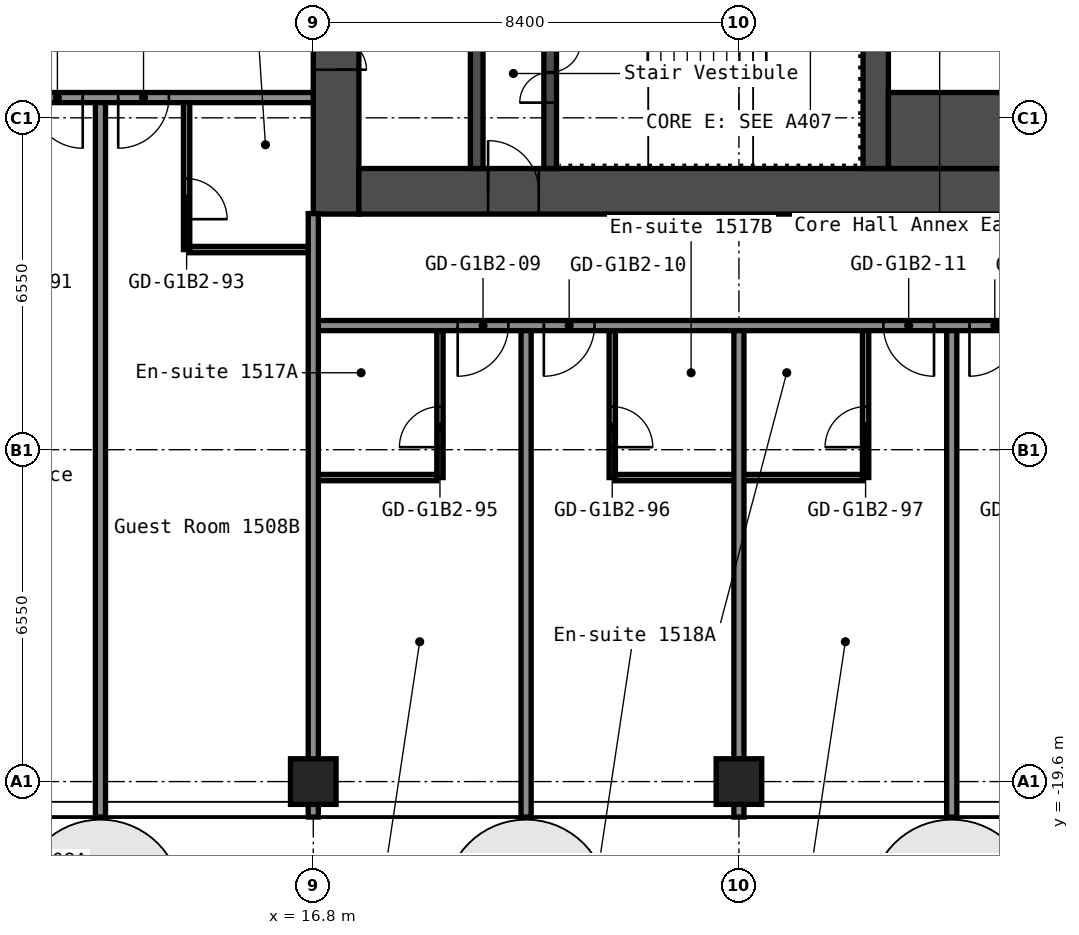
"""IFC4 building model, lengths in metres.
Left out: names, types, materials, properties, quantities, classifications, styles, units other than length and angle.
Written with IfcOpenShell. Run it as: python <this file> out.ifc"""

import sys

from ifc_helpers import new_model, si_unit, direction, frame, frame_2d, origin, origin_2d, place, context, subcontext, project, spatial, rectangle, hollow_rectangle, extrude, element, fill, save


model = new_model("IFC4")
c1 = context("Model", 3, precision=1e-05, world=origin(), true_north=direction((0.0, 1.0)))
c2 = subcontext(c1, "Body", "Model", "MODEL_VIEW")
j1 = project(units=[si_unit("LENGTHUNIT", "METRE"), si_unit("PLANEANGLEUNIT", "RADIAN")], contexts=[c1])
p1 = place(None, origin())
s1 = spatial("IfcSite", under=j1, at=p1, CompositionType="ELEMENT")
p2 = place(p1, origin())
s2 = spatial("IfcBuilding", under=s1, at=p2, CompositionType="ELEMENT")
p3 = place(p2, frame((0.0, 0.0, 55.0)))
s3 = spatial("IfcBuildingStorey", under=s2, at=p3, CompositionType="ELEMENT", Elevation=55.0)
for number, where, z_axis, x_axis in (
    (1, (16.8, -19.6, 0.0), (0.0, 0.0, 1.0), (1.0, 0.0, 0.0)),
    (2, (25.2, -19.6, 0.0), (0.0, 0.0, 1.0), (1.0, 0.0, 0.0)),
):
    element("IfcColumn", number, at=place(p3, frame(where, z_axis=z_axis, x_axis=x_axis)), inside=s3, PredefinedType="COLUMN", context=c2, shape_type="SweptSolid", body=[
        extrude(hollow_rectangle(XDim=0.9, YDim=0.9, WallThickness=0.036, at=origin_2d()), origin(), (0.0, 0.0, 1.0), 2.8),
    ])
p4 = place(p3, frame((17.25, -8.4, 0.0), z_axis=(0.0, 0.0, 1.0), x_axis=(0.0, 1.0, 0.0)))
e3 = element("IfcWall", 3, at=p4, inside=s3, PredefinedType="SHEAR", context=c2, shape_type="SweptSolid", body=[
    extrude(rectangle(XDim=16.8, YDim=0.9, at=frame_2d((8.4, 0.0))), origin(), (0.0, 0.0, 1.0), 2.8),
])
p5 = place(p4, frame((12.75, 0.0, 0.0)))
e4 = element("IfcOpeningElement", 4, at=p5, cuts=e3, PredefinedType="OPENING", context=c2, shape_type="SweptSolid", body=[
    extrude(rectangle(XDim=1.2, YDim=2.1, at=frame_2d((0.6, 1.05))), frame((0.0, 0.46, 0.0), z_axis=(0.0, -1.0, 0.0), x_axis=(1.0, 0.0, 0.0)), (0.0, 0.0, 1.0), 0.92),
])
p6 = place(p4, frame((2.85, 0.0, 0.0)))
e5 = element("IfcOpeningElement", 5, at=p6, cuts=e3, PredefinedType="OPENING", context=c2, shape_type="SweptSolid", body=[
    extrude(rectangle(XDim=1.2, YDim=2.1, at=frame_2d((0.6, 1.05))), frame((0.0, 0.46, 0.0), z_axis=(0.0, -1.0, 0.0), x_axis=(1.0, 0.0, 0.0)), (0.0, 0.0, 1.0), 0.92),
])
p7 = place(p3, frame((17.7, -7.95, 0.0), z_axis=(0.0, 0.0, 1.0), x_axis=(1.0, 0.0, 0.0)))
e6 = element("IfcWall", 6, at=p7, inside=s3, PredefinedType="SHEAR", context=c2, shape_type="SweptSolid", body=[
    extrude(rectangle(XDim=15.0, YDim=0.9, at=frame_2d((7.5, 0.0))), origin(), (0.0, 0.0, 1.0), 2.8),
])
p8 = place(p7, frame((2.55, 0.0, 0.0)))
e7 = element("IfcOpeningElement", 7, at=p8, cuts=e6, PredefinedType="OPENING", context=c2, shape_type="SweptSolid", body=[
    extrude(rectangle(XDim=1.0, YDim=2.1, at=frame_2d((0.5, 1.05))), frame((0.0, 0.46, 0.0), z_axis=(0.0, -1.0, 0.0), x_axis=(1.0, 0.0, 0.0)), (0.0, 0.0, 1.0), 0.92),
])
p9 = place(p3, frame((20.025, -7.5, 0.0), z_axis=(0.0, 0.0, 1.0), x_axis=(0.0, 1.0, 0.0)))
e8 = element("IfcWall", 8, at=p9, inside=s3, PredefinedType="SHEAR", context=c2, shape_type="SweptSolid", body=[
    extrude(rectangle(XDim=6.3, YDim=0.25, at=frame_2d((3.15, 0.0))), origin(), (0.0, 0.0, 1.0), 2.8),
])
p10 = place(p9, frame((2.4, 0.0, 0.0)))
e9 = element("IfcOpeningElement", 9, at=p10, cuts=e8, PredefinedType="OPENING", context=c2, shape_type="SweptSolid", body=[
    extrude(rectangle(XDim=1.0, YDim=2.1, at=frame_2d((0.5, 1.05))), frame((0.0, 0.135, 0.0), z_axis=(0.0, -1.0, 0.0), x_axis=(1.0, 0.0, 0.0)), (0.0, 0.0, 1.0), 0.27),
])
p11 = place(p3, frame((21.475, -7.5, 0.0), z_axis=(0.0, 0.0, 1.0), x_axis=(0.0, 1.0, 0.0)))
e10 = element("IfcWall", 10, at=p11, inside=s3, PredefinedType="SHEAR", context=c2, shape_type="SweptSolid", body=[
    extrude(rectangle(XDim=3.75, YDim=0.25, at=frame_2d((1.875, 0.0))), origin(), (0.0, 0.0, 1.0), 2.8),
])
p12 = place(p11, frame((1.3, 0.0, 0.0)))
e11 = element("IfcOpeningElement", 11, at=p12, cuts=e10, PredefinedType="OPENING", context=c2, shape_type="SweptSolid", body=[
    extrude(rectangle(XDim=1.2, YDim=2.1, at=frame_2d((0.6, 1.05))), frame((0.0, 0.135, 0.0), z_axis=(0.0, -1.0, 0.0), x_axis=(1.0, 0.0, 0.0)), (0.0, 0.0, 1.0), 0.27),
])
p13 = place(p3, frame((27.9, -7.5, 0.0), z_axis=(0.0, 0.0, 1.0), x_axis=(0.0, 1.0, 0.0)))
e12 = element("IfcWall", 12, at=p13, inside=s3, PredefinedType="SHEAR", context=c2, shape_type="SweptSolid", body=[
    extrude(rectangle(XDim=3.75, YDim=0.5, at=frame_2d((1.875, 0.0))), origin(), (0.0, 0.0, 1.0), 2.8),
])
p14 = place(p3, frame((28.15, -6.75, 0.0), z_axis=(0.0, 0.0, 1.0), x_axis=(1.0, 0.0, 0.0)))
e13 = element("IfcWall", 13, at=p14, inside=s3, PredefinedType="SHEAR", context=c2, shape_type="SweptSolid", body=[
    extrude(rectangle(XDim=4.55, YDim=1.5, at=frame_2d((2.275, 0.0))), origin(), (0.0, 0.0, 1.0), 2.8),
])
p15 = place(p3, frame((16.9, -13.6, 0.0), z_axis=(0.0, 0.0, 1.0), x_axis=(1.0, 0.0, 0.0)))
e14 = element("IfcWall", 14, at=p15, inside=s3, PredefinedType="PARTITIONING", context=c2, shape_type="SweptSolid", body=[
    extrude(rectangle(XDim=2.338, YDim=0.125, at=frame_2d((1.169, 0.0))), origin(), (0.0, 0.0, 1.0), 2.8),
])
p16 = place(p3, frame((22.762, -13.6, 0.0), z_axis=(0.0, 0.0, 1.0), x_axis=(1.0, 0.0, 0.0)))
e15 = element("IfcWall", 15, at=p16, inside=s3, PredefinedType="PARTITIONING", context=c2, shape_type="SweptSolid", body=[
    extrude(rectangle(XDim=4.875, YDim=0.125, at=frame_2d((2.438, 0.0))), origin(), (0.0, 0.0, 1.0), 2.8),
])
p17 = place(p3, frame((16.8, -10.6, 0.0), z_axis=(0.0, 0.0, 1.0), x_axis=(1.0, 0.0, 0.0)))
e16 = element("IfcWall", 16, at=p17, inside=s3, PredefinedType="PARTITIONING", context=c2, shape_type="SweptSolid", body=[
    extrude(rectangle(XDim=34.3, YDim=0.2, at=frame_2d((17.15, 0.0))), origin(), (0.0, 0.0, 1.0), 2.8),
])
p18 = place(p17, frame((2.85, 0.0, 0.0)))
e17 = element("IfcOpeningElement", 17, at=p18, cuts=e16, PredefinedType="OPENING", context=c2, shape_type="SweptSolid", body=[
    extrude(rectangle(XDim=1.0, YDim=2.1, at=frame_2d((0.5, 1.05))), frame((0.0, 0.11, 0.0), z_axis=(0.0, -1.0, 0.0), x_axis=(1.0, 0.0, 0.0)), (0.0, 0.0, 1.0), 0.22),
])
p19 = place(p17, frame((4.55, 0.0, 0.0)))
e18 = element("IfcOpeningElement", 18, at=p19, cuts=e16, PredefinedType="OPENING", context=c2, shape_type="SweptSolid", body=[
    extrude(rectangle(XDim=1.0, YDim=2.1, at=frame_2d((0.5, 1.05))), frame((0.0, 0.11, 0.0), z_axis=(0.0, -1.0, 0.0), x_axis=(1.0, 0.0, 0.0)), (0.0, 0.0, 1.0), 0.22),
])
p20 = place(p17, frame((11.25, 0.0, 0.0)))
e19 = element("IfcOpeningElement", 19, at=p20, cuts=e16, PredefinedType="OPENING", context=c2, shape_type="SweptSolid", body=[
    extrude(rectangle(XDim=1.0, YDim=2.1, at=frame_2d((0.5, 1.05))), frame((0.0, 0.11, 0.0), z_axis=(0.0, -1.0, 0.0), x_axis=(1.0, 0.0, 0.0)), (0.0, 0.0, 1.0), 0.22),
])
p21 = place(p17, frame((12.95, 0.0, 0.0)))
e20 = element("IfcOpeningElement", 20, at=p21, cuts=e16, PredefinedType="OPENING", context=c2, shape_type="SweptSolid", body=[
    extrude(rectangle(XDim=1.0, YDim=2.1, at=frame_2d((0.5, 1.05))), frame((0.0, 0.11, 0.0), z_axis=(0.0, -1.0, 0.0), x_axis=(1.0, 0.0, 0.0)), (0.0, 0.0, 1.0), 0.22),
])
p22 = place(p17, frame((19.65, 0.0, 0.0)))
e21 = element("IfcOpeningElement", 21, at=p22, cuts=e16, PredefinedType="OPENING", context=c2, shape_type="SweptSolid", body=[
    extrude(rectangle(XDim=1.0, YDim=2.1, at=frame_2d((0.5, 1.05))), frame((0.0, 0.11, 0.0), z_axis=(0.0, -1.0, 0.0), x_axis=(1.0, 0.0, 0.0)), (0.0, 0.0, 1.0), 0.22),
])
p23 = place(p17, frame((21.35, 0.0, 0.0)))
e22 = element("IfcOpeningElement", 22, at=p23, cuts=e16, PredefinedType="OPENING", context=c2, shape_type="SweptSolid", body=[
    extrude(rectangle(XDim=1.0, YDim=2.1, at=frame_2d((0.5, 1.05))), frame((0.0, 0.11, 0.0), z_axis=(0.0, -1.0, 0.0), x_axis=(1.0, 0.0, 0.0)), (0.0, 0.0, 1.0), 0.22),
])
p24 = place(p17, frame((28.15, 0.0, 0.0)))
e23 = element("IfcOpeningElement", 23, at=p24, cuts=e16, PredefinedType="OPENING", context=c2, shape_type="SweptSolid", body=[
    extrude(rectangle(XDim=1.0, YDim=2.1, at=frame_2d((0.5, 1.05))), frame((0.0, 0.11, 0.0), z_axis=(0.0, -1.0, 0.0), x_axis=(1.0, 0.0, 0.0)), (0.0, 0.0, 1.0), 0.22),
])
p25 = place(p17, frame((30.05, 0.0, 0.0)))
e24 = element("IfcOpeningElement", 24, at=p25, cuts=e16, PredefinedType="OPENING", context=c2, shape_type="SweptSolid", body=[
    extrude(rectangle(XDim=1.0, YDim=2.1, at=frame_2d((0.5, 1.05))), frame((0.0, 0.11, 0.0), z_axis=(0.0, -1.0, 0.0), x_axis=(1.0, 0.0, 0.0)), (0.0, 0.0, 1.0), 0.22),
])
p26 = place(p3, frame((14.363, -9.1, 0.0), z_axis=(0.0, 0.0, 1.0), x_axis=(1.0, 0.0, 0.0)))
e25 = element("IfcWall", 25, at=p26, inside=s3, PredefinedType="PARTITIONING", context=c2, shape_type="SweptSolid", body=[
    extrude(rectangle(XDim=2.337, YDim=0.125, at=frame_2d((1.169, 0.0))), origin(), (0.0, 0.0, 1.0), 2.8),
])
p27 = place(p3, frame((-16.8, -6.1, 0.0), z_axis=(0.0, 0.0, 1.0), x_axis=(1.0, 0.0, 0.0)))
e26 = element("IfcWall", 26, at=p27, inside=s3, PredefinedType="PARTITIONING", context=c2, shape_type="SweptSolid", body=[
    extrude(rectangle(XDim=33.6, YDim=0.2, at=frame_2d((16.8, 0.0))), origin(), (0.0, 0.0, 1.0), 2.8),
])
p28 = place(p27, frame((2.85, 0.0, 0.0)))
e27 = element("IfcOpeningElement", 27, at=p28, cuts=e26, PredefinedType="OPENING", context=c2, shape_type="SweptSolid", body=[
    extrude(rectangle(XDim=1.0, YDim=2.1, at=frame_2d((0.5, 1.05))), frame((0.0, 0.11, 0.0), z_axis=(0.0, -1.0, 0.0), x_axis=(1.0, 0.0, 0.0)), (0.0, 0.0, 1.0), 0.22),
])
p29 = place(p27, frame((4.55, 0.0, 0.0)))
e28 = element("IfcOpeningElement", 28, at=p29, cuts=e26, PredefinedType="OPENING", context=c2, shape_type="SweptSolid", body=[
    extrude(rectangle(XDim=1.0, YDim=2.1, at=frame_2d((0.5, 1.05))), frame((0.0, 0.11, 0.0), z_axis=(0.0, -1.0, 0.0), x_axis=(1.0, 0.0, 0.0)), (0.0, 0.0, 1.0), 0.22),
])
p30 = place(p27, frame((11.25, 0.0, 0.0)))
e29 = element("IfcOpeningElement", 29, at=p30, cuts=e26, PredefinedType="OPENING", context=c2, shape_type="SweptSolid", body=[
    extrude(rectangle(XDim=1.0, YDim=2.1, at=frame_2d((0.5, 1.05))), frame((0.0, 0.11, 0.0), z_axis=(0.0, -1.0, 0.0), x_axis=(1.0, 0.0, 0.0)), (0.0, 0.0, 1.0), 0.22),
])
p31 = place(p27, frame((12.95, 0.0, 0.0)))
e30 = element("IfcOpeningElement", 30, at=p31, cuts=e26, PredefinedType="OPENING", context=c2, shape_type="SweptSolid", body=[
    extrude(rectangle(XDim=1.0, YDim=2.1, at=frame_2d((0.5, 1.05))), frame((0.0, 0.11, 0.0), z_axis=(0.0, -1.0, 0.0), x_axis=(1.0, 0.0, 0.0)), (0.0, 0.0, 1.0), 0.22),
])
p32 = place(p27, frame((18.7, 0.0, 0.0)))
e31 = element("IfcOpeningElement", 31, at=p32, cuts=e26, PredefinedType="OPENING", context=c2, shape_type="SweptSolid", body=[
    extrude(rectangle(XDim=0.9, YDim=2.1, at=frame_2d((0.45, 1.05))), frame((0.0, 0.11, 0.0), z_axis=(0.0, -1.0, 0.0), x_axis=(1.0, 0.0, 0.0)), (0.0, 0.0, 1.0), 0.22),
])
p33 = place(p27, frame((22.9, 0.0, 0.0)))
e32 = element("IfcOpeningElement", 32, at=p33, cuts=e26, PredefinedType="OPENING", context=c2, shape_type="SweptSolid", body=[
    extrude(rectangle(XDim=0.9, YDim=2.1, at=frame_2d((0.45, 1.05))), frame((0.0, 0.11, 0.0), z_axis=(0.0, -1.0, 0.0), x_axis=(1.0, 0.0, 0.0)), (0.0, 0.0, 1.0), 0.22),
])
p34 = place(p27, frame((28.05, 0.0, 0.0)))
e33 = element("IfcOpeningElement", 33, at=p34, cuts=e26, PredefinedType="OPENING", context=c2, shape_type="SweptSolid", body=[
    extrude(rectangle(XDim=1.0, YDim=2.1, at=frame_2d((0.5, 1.05))), frame((0.0, 0.11, 0.0), z_axis=(0.0, -1.0, 0.0), x_axis=(1.0, 0.0, 0.0)), (0.0, 0.0, 1.0), 0.22),
])
p35 = place(p27, frame((29.75, 0.0, 0.0)))
e34 = element("IfcOpeningElement", 34, at=p35, cuts=e26, PredefinedType="OPENING", context=c2, shape_type="SweptSolid", body=[
    extrude(rectangle(XDim=1.0, YDim=2.1, at=frame_2d((0.5, 1.05))), frame((0.0, 0.11, 0.0), z_axis=(0.0, -1.0, 0.0), x_axis=(1.0, 0.0, 0.0)), (0.0, 0.0, 1.0), 0.22),
])
p36 = place(p3, frame((12.6, -20.3, 0.0), z_axis=(0.0, 0.0, 1.0), x_axis=(0.0, 1.0, 0.0)))
e35 = element("IfcWall", 35, at=p36, inside=s3, PredefinedType="PARTITIONING", context=c2, shape_type="SweptSolid", body=[
    extrude(rectangle(XDim=14.1, YDim=0.2, at=frame_2d((7.05, 0.0))), origin(), (0.0, 0.0, 1.0), 2.8),
])
p37 = place(p3, frame((14.3, -9.1, 0.0), z_axis=(0.0, 0.0, 1.0), x_axis=(0.0, 1.0, 0.0)))
e36 = element("IfcWall", 36, at=p37, inside=s3, PredefinedType="PARTITIONING", context=c2, shape_type="SweptSolid", body=[
    extrude(rectangle(XDim=2.9, YDim=0.125, at=frame_2d((1.45, 0.0))), origin(), (0.0, 0.0, 1.0), 2.8),
])
p38 = place(p37, frame((0.6, 0.0, 0.0)))
e37 = element("IfcOpeningElement", 37, at=p38, cuts=e36, PredefinedType="OPENING", context=c2, shape_type="SweptSolid", body=[
    extrude(rectangle(XDim=0.8, YDim=2.1, at=frame_2d((0.4, 1.05))), frame((0.0, 0.073, 0.0), z_axis=(0.0, -1.0, 0.0), x_axis=(1.0, 0.0, 0.0)), (0.0, 0.0, 1.0), 0.145),
])
p39 = place(p3, frame((16.8, -20.3, 0.0), z_axis=(0.0, 0.0, 1.0), x_axis=(0.0, 1.0, 0.0)))
e38 = element("IfcWall", 38, at=p39, inside=s3, PredefinedType="PARTITIONING", context=c2, shape_type="SweptSolid", body=[
    extrude(rectangle(XDim=11.91, YDim=0.2, at=frame_2d((5.955, 0.0))), origin(), (0.0, 0.0, 1.0), 2.8),
])
p40 = place(p3, frame((19.3, -13.6, 0.0), z_axis=(0.0, 0.0, 1.0), x_axis=(0.0, 1.0, 0.0)))
e39 = element("IfcWall", 39, at=p40, inside=s3, PredefinedType="PARTITIONING", context=c2, shape_type="SweptSolid", body=[
    extrude(rectangle(XDim=2.9, YDim=0.125, at=frame_2d((1.45, 0.0))), origin(), (0.0, 0.0, 1.0), 2.8),
])
p41 = place(p40, frame((0.6, 0.0, 0.0)))
e40 = element("IfcOpeningElement", 40, at=p41, cuts=e39, PredefinedType="OPENING", context=c2, shape_type="SweptSolid", body=[
    extrude(rectangle(XDim=0.8, YDim=2.1, at=frame_2d((0.4, 1.05))), frame((0.0, 0.073, 0.0), z_axis=(0.0, -1.0, 0.0), x_axis=(1.0, 0.0, 0.0)), (0.0, 0.0, 1.0), 0.145),
])
p42 = place(p3, frame((21.0, -20.3, 0.0), z_axis=(0.0, 0.0, 1.0), x_axis=(0.0, 1.0, 0.0)))
e41 = element("IfcWall", 41, at=p42, inside=s3, PredefinedType="PARTITIONING", context=c2, shape_type="SweptSolid", body=[
    extrude(rectangle(XDim=9.6, YDim=0.2, at=frame_2d((4.8, 0.0))), origin(), (0.0, 0.0, 1.0), 2.8),
])
p43 = place(p3, frame((22.7, -13.6, 0.0), z_axis=(0.0, 0.0, 1.0), x_axis=(0.0, 1.0, 0.0)))
e42 = element("IfcWall", 42, at=p43, inside=s3, PredefinedType="PARTITIONING", context=c2, shape_type="SweptSolid", body=[
    extrude(rectangle(XDim=2.9, YDim=0.125, at=frame_2d((1.45, 0.0))), origin(), (0.0, 0.0, 1.0), 2.8),
])
p44 = place(p43, frame((0.6, 0.0, 0.0)))
e43 = element("IfcOpeningElement", 43, at=p44, cuts=e42, PredefinedType="OPENING", context=c2, shape_type="SweptSolid", body=[
    extrude(rectangle(XDim=0.8, YDim=2.1, at=frame_2d((0.4, 1.05))), frame((0.0, 0.073, 0.0), z_axis=(0.0, -1.0, 0.0), x_axis=(1.0, 0.0, 0.0)), (0.0, 0.0, 1.0), 0.145),
])
p45 = place(p3, frame((25.2, -20.3, 0.0), z_axis=(0.0, 0.0, 1.0), x_axis=(0.0, 1.0, 0.0)))
e44 = element("IfcWall", 44, at=p45, inside=s3, PredefinedType="PARTITIONING", context=c2, shape_type="SweptSolid", body=[
    extrude(rectangle(XDim=9.6, YDim=0.2, at=frame_2d((4.8, 0.0))), origin(), (0.0, 0.0, 1.0), 2.8),
])
p46 = place(p3, frame((27.7, -13.6, 0.0), z_axis=(0.0, 0.0, 1.0), x_axis=(0.0, 1.0, 0.0)))
e45 = element("IfcWall", 45, at=p46, inside=s3, PredefinedType="PARTITIONING", context=c2, shape_type="SweptSolid", body=[
    extrude(rectangle(XDim=2.9, YDim=0.125, at=frame_2d((1.45, 0.0))), origin(), (0.0, 0.0, 1.0), 2.8),
])
p47 = place(p46, frame((0.6, 0.0, 0.0)))
e46 = element("IfcOpeningElement", 46, at=p47, cuts=e45, PredefinedType="OPENING", context=c2, shape_type="SweptSolid", body=[
    extrude(rectangle(XDim=0.8, YDim=2.1, at=frame_2d((0.4, 1.05))), frame((0.0, 0.073, 0.0), z_axis=(0.0, -1.0, 0.0), x_axis=(1.0, 0.0, 0.0)), (0.0, 0.0, 1.0), 0.145),
])
p48 = place(p3, frame((29.4, -20.3, 0.0), z_axis=(0.0, 0.0, 1.0), x_axis=(0.0, 1.0, 0.0)))
e47 = element("IfcWall", 47, at=p48, inside=s3, PredefinedType="PARTITIONING", context=c2, shape_type="SweptSolid", body=[
    extrude(rectangle(XDim=9.6, YDim=0.2, at=frame_2d((4.8, 0.0))), origin(), (0.0, 0.0, 1.0), 2.8),
])
p49 = place(p6, origin())
e48 = element("IfcDoor", 48, at=p49, inside=s3, OperationType="DOUBLE_DOOR_SINGLE_SWING", PredefinedType="DOOR", context=c2, shape_type="SweptSolid", body=[
    extrude(rectangle(XDim=1.2, YDim=2.1, at=frame_2d((0.6, 1.05))), frame((0.0, 0.025, 0.0), z_axis=(0.0, -1.0, 0.0), x_axis=(1.0, 0.0, 0.0)), (0.0, 0.0, 1.0), 0.05),
])
fill(e5, e48)
p50 = place(p8, origin())
e49 = element("IfcDoor", 49, at=p50, inside=s3, OperationType="SINGLE_SWING_RIGHT", PredefinedType="DOOR", context=c2, shape_type="SweptSolid", body=[
    extrude(rectangle(XDim=1.0, YDim=2.1, at=frame_2d((0.5, 1.05))), frame((0.0, 0.025, 0.0), z_axis=(0.0, -1.0, 0.0), x_axis=(1.0, 0.0, 0.0)), (0.0, 0.0, 1.0), 0.05),
])
fill(e7, e49)
p51 = place(p12, origin())
e50 = element("IfcDoor", 50, at=p51, inside=s3, OperationType="DOUBLE_DOOR_SINGLE_SWING", PredefinedType="DOOR", context=c2, shape_type="SweptSolid", body=[
    extrude(rectangle(XDim=1.2, YDim=2.1, at=frame_2d((0.6, 1.05))), frame((0.0, 0.025, 0.0), z_axis=(0.0, -1.0, 0.0), x_axis=(1.0, 0.0, 0.0)), (0.0, 0.0, 1.0), 0.05),
])
fill(e11, e50)
p52 = place(p18, origin())
e51 = element("IfcDoor", 51, at=p52, inside=s3, OperationType="SINGLE_SWING_LEFT", PredefinedType="DOOR", context=c2, shape_type="SweptSolid", body=[
    extrude(rectangle(XDim=1.0, YDim=2.1, at=frame_2d((0.5, 1.05))), frame((0.0, 0.025, 0.0), z_axis=(0.0, -1.0, 0.0), x_axis=(1.0, 0.0, 0.0)), (0.0, 0.0, 1.0), 0.05),
])
fill(e17, e51)
p53 = place(p19, origin())
e52 = element("IfcDoor", 52, at=p53, inside=s3, OperationType="SINGLE_SWING_LEFT", PredefinedType="DOOR", context=c2, shape_type="SweptSolid", body=[
    extrude(rectangle(XDim=1.0, YDim=2.1, at=frame_2d((0.5, 1.05))), frame((0.0, 0.025, 0.0), z_axis=(0.0, -1.0, 0.0), x_axis=(1.0, 0.0, 0.0)), (0.0, 0.0, 1.0), 0.05),
])
fill(e18, e52)
p54 = place(p20, origin())
e53 = element("IfcDoor", 53, at=p54, inside=s3, OperationType="SINGLE_SWING_RIGHT", PredefinedType="DOOR", context=c2, shape_type="SweptSolid", body=[
    extrude(rectangle(XDim=1.0, YDim=2.1, at=frame_2d((0.5, 1.05))), frame((0.0, 0.025, 0.0), z_axis=(0.0, -1.0, 0.0), x_axis=(1.0, 0.0, 0.0)), (0.0, 0.0, 1.0), 0.05),
])
fill(e19, e53)
p55 = place(p21, origin())
e54 = element("IfcDoor", 54, at=p55, inside=s3, OperationType="SINGLE_SWING_LEFT", PredefinedType="DOOR", context=c2, shape_type="SweptSolid", body=[
    extrude(rectangle(XDim=1.0, YDim=2.1, at=frame_2d((0.5, 1.05))), frame((0.0, 0.025, 0.0), z_axis=(0.0, -1.0, 0.0), x_axis=(1.0, 0.0, 0.0)), (0.0, 0.0, 1.0), 0.05),
])
fill(e20, e54)
p56 = place(p34, origin())
e55 = element("IfcDoor", 55, at=p56, inside=s3, OperationType="SINGLE_SWING_RIGHT", PredefinedType="DOOR", context=c2, shape_type="SweptSolid", body=[
    extrude(rectangle(XDim=1.0, YDim=2.1, at=frame_2d((0.5, 1.05))), frame((0.0, 0.025, 0.0), z_axis=(0.0, -1.0, 0.0), x_axis=(1.0, 0.0, 0.0)), (0.0, 0.0, 1.0), 0.05),
])
fill(e33, e55)
p57 = place(p35, origin())
e56 = element("IfcDoor", 56, at=p57, inside=s3, OperationType="SINGLE_SWING_LEFT", PredefinedType="DOOR", context=c2, shape_type="SweptSolid", body=[
    extrude(rectangle(XDim=1.0, YDim=2.1, at=frame_2d((0.5, 1.05))), frame((0.0, 0.025, 0.0), z_axis=(0.0, -1.0, 0.0), x_axis=(1.0, 0.0, 0.0)), (0.0, 0.0, 1.0), 0.05),
])
fill(e34, e56)
p58 = place(p38, origin())
e57 = element("IfcDoor", 57, at=p58, inside=s3, OperationType="SINGLE_SWING_LEFT", PredefinedType="DOOR", context=c2, shape_type="SweptSolid", body=[
    extrude(rectangle(XDim=0.8, YDim=2.1, at=frame_2d((0.4, 1.05))), frame((0.0, 0.025, 0.0), z_axis=(0.0, -1.0, 0.0), x_axis=(1.0, 0.0, 0.0)), (0.0, 0.0, 1.0), 0.05),
])
fill(e37, e57)
p59 = place(p41, origin())
e58 = element("IfcDoor", 58, at=p59, inside=s3, OperationType="SINGLE_SWING_RIGHT", PredefinedType="DOOR", context=c2, shape_type="SweptSolid", body=[
    extrude(rectangle(XDim=0.8, YDim=2.1, at=frame_2d((0.4, 1.05))), frame((0.0, 0.025, 0.0), z_axis=(0.0, -1.0, 0.0), x_axis=(1.0, 0.0, 0.0)), (0.0, 0.0, 1.0), 0.05),
])
fill(e40, e58)
p60 = place(p44, origin())
e59 = element("IfcDoor", 59, at=p60, inside=s3, OperationType="SINGLE_SWING_LEFT", PredefinedType="DOOR", context=c2, shape_type="SweptSolid", body=[
    extrude(rectangle(XDim=0.8, YDim=2.1, at=frame_2d((0.4, 1.05))), frame((0.0, 0.025, 0.0), z_axis=(0.0, -1.0, 0.0), x_axis=(1.0, 0.0, 0.0)), (0.0, 0.0, 1.0), 0.05),
])
fill(e43, e59)
p61 = place(p47, origin())
e60 = element("IfcDoor", 60, at=p61, inside=s3, OperationType="SINGLE_SWING_RIGHT", PredefinedType="DOOR", context=c2, shape_type="SweptSolid", body=[
    extrude(rectangle(XDim=0.8, YDim=2.1, at=frame_2d((0.4, 1.05))), frame((0.0, 0.025, 0.0), z_axis=(0.0, -1.0, 0.0), x_axis=(1.0, 0.0, 0.0)), (0.0, 0.0, 1.0), 0.05),
])
fill(e46, e60)
save(model, sys.argv[1])
